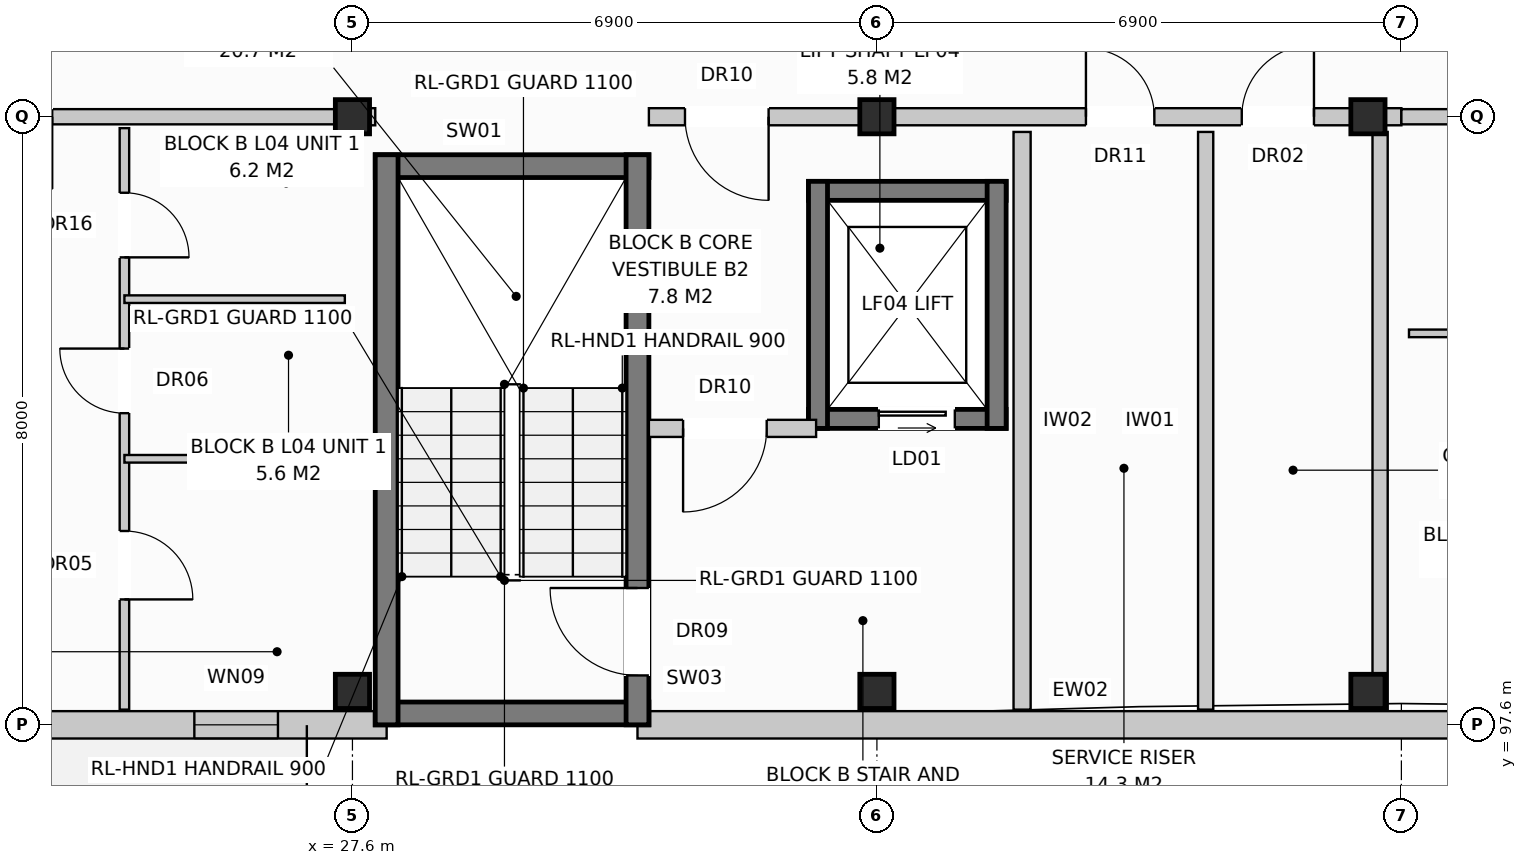
"""IFC4 building model, lengths in metres.
Left out: names, types, materials, properties, quantities, classifications, styles, units other than length and angle.
Written with IfcOpenShell. Run it as: python <this file> out.ifc"""

import sys

from ifc_helpers import new_model, si_unit, direction, frame, frame_2d, origin, origin_with_axes, origin_2d, place, context, subcontext, project, spatial, rectangle, extrude, element, fill, save


model = new_model("IFC4")
c1 = context("Model", 3, precision=1e-05, world=origin(), true_north=direction((0.0, 1.0)))
c2 = subcontext(c1, "Body", "Model", "MODEL_VIEW")
j1 = project(units=[si_unit("LENGTHUNIT", "METRE"), si_unit("PLANEANGLEUNIT", "RADIAN")], contexts=[c1])
p1 = place(None, origin())
s1 = spatial("IfcSite", under=j1, at=p1, CompositionType="ELEMENT")
p2 = place(p1, origin())
s2 = spatial("IfcBuilding", under=s1, at=p2, CompositionType="ELEMENT")
p3 = place(p2, frame((0.0, 0.0, 14.4)))
s3 = spatial("IfcBuildingStorey", under=s2, at=p3, CompositionType="ELEMENT", Elevation=14.4)
for number, where, z_axis, x_axis in (
    (1, (27.6, 98.04, 0.0), (0.0, 0.0, 1.0), (1.0, 0.0, 0.0)),
    (2, (27.6, 105.6, 0.0), (0.0, 0.0, 1.0), (1.0, 0.0, 0.0)),
    (3, (34.5, 98.04, 0.0), (0.0, 0.0, 1.0), (1.0, 0.0, 0.0)),
    (4, (34.5, 105.6, 0.0), (0.0, 0.0, 1.0), (1.0, 0.0, 0.0)),
    (5, (40.96, 98.04, 0.0), (0.0, 0.0, 1.0), (1.0, 0.0, 0.0)),
    (6, (40.96, 105.6, 0.0), (0.0, 0.0, 1.0), (1.0, 0.0, 0.0)),
):
    element("IfcColumn", number, at=place(p3, frame(where, z_axis=z_axis, x_axis=x_axis)), inside=s3, PredefinedType="COLUMN", context=c2, shape_type="SweptSolid", body=[
        extrude(rectangle(XDim=0.45, YDim=0.45, at=origin_2d()), origin(), (0.0, 0.0, 1.0), 3.2),
    ])
p4 = place(p3, frame((10.65, 97.6, 0.0), z_axis=(0.0, 0.0, 1.0), x_axis=(1.0, 0.0, 0.0)))
e7 = element("IfcWall", 7, at=p4, inside=s3, PredefinedType="STANDARD", context=c2, shape_type="SweptSolid", body=[
    extrude(rectangle(XDim=17.4, YDim=0.36, at=frame_2d((8.7, 0.0))), origin(), (0.0, 0.0, 1.0), 2.94),
])
p5 = place(p4, frame((11.87, 0.0, 0.0)))
e8 = element("IfcOpeningElement", 8, at=p5, cuts=e7, PredefinedType="OPENING", context=c2, shape_type="SweptSolid", body=[
    extrude(rectangle(XDim=0.95, YDim=2.1, at=frame_2d((0.475, 1.05))), frame((0.0, 0.192, 0.0), z_axis=(0.0, -1.0, 0.0), x_axis=(1.0, 0.0, 0.0)), (0.0, 0.0, 1.0), 0.384),
])
p6 = place(p4, frame((14.87, 0.0, 0.72)))
e9 = element("IfcOpeningElement", 9, at=p6, cuts=e7, PredefinedType="OPENING", context=c2, shape_type="SweptSolid", body=[
    extrude(rectangle(XDim=1.1, YDim=1.5, at=frame_2d((0.55, 0.75))), frame((0.0, 0.192, 0.0), z_axis=(0.0, -1.0, 0.0), x_axis=(1.0, 0.0, 0.0)), (0.0, 0.0, 1.0), 0.384),
])
p7 = place(p3, frame((31.35, 97.6, 0.0), z_axis=(0.0, 0.0, 1.0), x_axis=(1.0, 0.0, 0.0)))
e10 = element("IfcWall", 10, at=p7, inside=s3, PredefinedType="STANDARD", context=c2, shape_type="SweptSolid", body=[
    extrude(rectangle(XDim=23.68, YDim=0.36, at=frame_2d((11.84, 0.0))), origin(), (0.0, 0.0, 1.0), 2.94),
])
p8 = place(p7, frame((13.048, 0.0, 0.0)))
e11 = element("IfcOpeningElement", 11, at=p8, cuts=e10, PredefinedType="OPENING", context=c2, shape_type="SweptSolid", body=[
    extrude(rectangle(XDim=0.95, YDim=2.1, at=frame_2d((0.475, 1.05))), frame((0.0, 0.192, 0.0), z_axis=(0.0, -1.0, 0.0), x_axis=(1.0, 0.0, 0.0)), (0.0, 0.0, 1.0), 0.384),
])
p9 = place(p7, frame((10.845, 0.0, 0.8)))
e12 = element("IfcOpeningElement", 12, at=p9, cuts=e10, PredefinedType="OPENING", context=c2, shape_type="SweptSolid", body=[
    extrude(rectangle(XDim=1.95, YDim=1.65, at=frame_2d((0.975, 0.825))), frame((0.0, 0.192, 0.0), z_axis=(0.0, -1.0, 0.0), x_axis=(1.0, 0.0, 0.0)), (0.0, 0.0, 1.0), 0.384),
])
p10 = place(p7, frame((14.62, 0.0, 0.8)))
e13 = element("IfcOpeningElement", 13, at=p10, cuts=e10, PredefinedType="OPENING", context=c2, shape_type="SweptSolid", body=[
    extrude(rectangle(XDim=1.8, YDim=1.7, at=frame_2d((0.9, 0.85))), frame((0.0, 0.192, 0.0), z_axis=(0.0, -1.0, 0.0), x_axis=(1.0, 0.0, 0.0)), (0.0, 0.0, 1.0), 0.384),
])
p11 = place(p7, frame((20.67, 0.0, 0.72)))
e14 = element("IfcOpeningElement", 14, at=p11, cuts=e10, PredefinedType="OPENING", context=c2, shape_type="SweptSolid", body=[
    extrude(rectangle(XDim=1.1, YDim=1.5, at=frame_2d((0.55, 0.75))), frame((0.0, 0.192, 0.0), z_axis=(0.0, -1.0, 0.0), x_axis=(1.0, 0.0, 0.0)), (0.0, 0.0, 1.0), 0.384),
])
for number, where, z_axis, x_axis in (
    (15, (27.9, 97.75, 0.0), (0.0, 0.0, 1.0), (1.0, 0.0, 0.0)),
    (16, (27.9, 104.95, 0.0), (0.0, 0.0, 1.0), (1.0, 0.0, 0.0)),
):
    element("IfcWall", number, at=place(p3, frame(where, z_axis=z_axis, x_axis=x_axis)), inside=s3, PredefinedType="SHEAR", context=c2, shape_type="SweptSolid", body=[
        extrude(rectangle(XDim=3.6, YDim=0.3, at=frame_2d((1.8, 0.0))), origin(), (0.0, 0.0, 1.0), 2.94),
    ])
p12 = place(p3, frame((28.05, 97.6, 0.0), z_axis=(0.0, 0.0, 1.0), x_axis=(0.0, 1.0, 0.0)))
e17 = element("IfcWall", 17, at=p12, inside=s3, PredefinedType="SHEAR", context=c2, shape_type="SweptSolid", body=[
    extrude(rectangle(XDim=7.5, YDim=0.3, at=frame_2d((3.75, 0.0))), origin(), (0.0, 0.0, 1.0), 2.94),
])
p13 = place(p3, frame((31.35, 97.6, 0.0), z_axis=(0.0, 0.0, 1.0), x_axis=(0.0, 1.0, 0.0)))
e18 = element("IfcWall", 18, at=p13, inside=s3, PredefinedType="SHEAR", context=c2, shape_type="SweptSolid", body=[
    extrude(rectangle(XDim=7.5, YDim=0.3, at=frame_2d((3.75, 0.0))), origin(), (0.0, 0.0, 1.0), 2.94),
])
p14 = place(p13, frame((0.65, 0.0, 0.0)))
e19 = element("IfcOpeningElement", 19, at=p14, cuts=e18, PredefinedType="OPENING", context=c2, shape_type="SweptSolid", body=[
    extrude(rectangle(XDim=1.15, YDim=2.15, at=frame_2d((0.575, 1.075))), frame((0.0, 0.162, 0.0), z_axis=(0.0, -1.0, 0.0), x_axis=(1.0, 0.0, 0.0)), (0.0, 0.0, 1.0), 0.324),
])
p15 = place(p3, frame((33.6, 101.625, 0.0), z_axis=(0.0, 0.0, 1.0), x_axis=(1.0, 0.0, 0.0)))
e20 = element("IfcWall", 20, at=p15, inside=s3, PredefinedType="SHEAR", context=c2, shape_type="SweptSolid", body=[
    extrude(rectangle(XDim=2.6, YDim=0.25, at=frame_2d((1.3, 0.0))), origin(), (0.0, 0.0, 1.0), 2.94),
])
p16 = place(p15, frame((0.925, 0.0, 0.0)))
e21 = element("IfcOpeningElement", 21, at=p16, cuts=e20, PredefinedType="OPENING", context=c2, shape_type="SweptSolid", body=[
    extrude(rectangle(XDim=1.0, YDim=2.1, at=frame_2d((0.5, 1.05))), frame((0.0, 0.137, 0.0), z_axis=(0.0, -1.0, 0.0), x_axis=(1.0, 0.0, 0.0)), (0.0, 0.0, 1.0), 0.274),
])
p17 = place(p3, frame((33.6, 104.625, 0.0), z_axis=(0.0, 0.0, 1.0), x_axis=(1.0, 0.0, 0.0)))
e22 = element("IfcWall", 22, at=p17, inside=s3, PredefinedType="SHEAR", context=c2, shape_type="SweptSolid", body=[
    extrude(rectangle(XDim=2.6, YDim=0.25, at=frame_2d((1.3, 0.0))), origin(), (0.0, 0.0, 1.0), 2.94),
])
for number, where, z_axis, x_axis in (
    (23, (33.725, 101.5, 0.0), (0.0, 0.0, 1.0), (0.0, 1.0, 0.0)),
    (24, (36.075, 101.5, 0.0), (0.0, 0.0, 1.0), (0.0, 1.0, 0.0)),
):
    element("IfcWall", number, at=place(p3, frame(where, z_axis=z_axis, x_axis=x_axis)), inside=s3, PredefinedType="SHEAR", context=c2, shape_type="SweptSolid", body=[
        extrude(rectangle(XDim=3.25, YDim=0.25, at=frame_2d((1.625, 0.0))), origin(), (0.0, 0.0, 1.0), 2.94),
    ])
p18 = place(p3, frame((36.41, 97.8, 0.0), z_axis=(0.0, 0.0, 1.0), x_axis=(0.0, 1.0, 0.0)))
e25 = element("IfcWall", 25, at=p18, inside=s3, PredefinedType="PARTITIONING", context=c2, shape_type="SweptSolid", body=[
    extrude(rectangle(XDim=7.6, YDim=0.225, at=frame_2d((3.8, 0.0))), origin(), (0.0, 0.0, 1.0), 2.59),
])
p19 = place(p3, frame((31.5, 101.5, 0.0), z_axis=(0.0, 0.0, 1.0), x_axis=(1.0, 0.0, 0.0)))
e26 = element("IfcWall", 26, at=p19, inside=s3, PredefinedType="PARTITIONING", context=c2, shape_type="SweptSolid", body=[
    extrude(rectangle(XDim=2.2, YDim=0.225, at=frame_2d((1.1, 0.0))), origin(), (0.0, 0.0, 1.0), 2.94),
])
p20 = place(p19, frame((0.45, 0.0, 0.0)))
e27 = element("IfcOpeningElement", 27, at=p20, cuts=e26, PredefinedType="OPENING", context=c2, shape_type="SweptSolid", body=[
    extrude(rectangle(XDim=1.1, YDim=2.15, at=frame_2d((0.55, 1.075))), frame((0.0, 0.125, 0.0), z_axis=(0.0, -1.0, 0.0), x_axis=(1.0, 0.0, 0.0)), (0.0, 0.0, 1.0), 0.249),
])
p21 = place(p3, frame((27.6, 105.6, 0.0), z_axis=(0.0, 0.0, 1.0), x_axis=(1.0, 0.0, 0.0)))
e28 = element("IfcWall", 28, at=p21, inside=s3, PredefinedType="PARTITIONING", context=c2, shape_type="SweptSolid", body=[
    extrude(rectangle(XDim=0.3, YDim=0.225, at=frame_2d((0.15, 0.0))), origin(), (0.0, 0.0, 1.0), 2.94),
])
for number, where, z_axis, x_axis in (
    (29, (38.825, 97.8, 0.0), (0.0, 0.0, 1.0), (0.0, 1.0, 0.0)),
    (30, (41.12, 97.8, 0.0), (0.0, 0.0, 1.0), (0.0, 1.0, 0.0)),
):
    element("IfcWall", number, at=place(p3, frame(where, z_axis=z_axis, x_axis=x_axis)), inside=s3, PredefinedType="PARTITIONING", context=c2, shape_type="SweptSolid", body=[
        extrude(rectangle(XDim=7.6, YDim=0.2, at=frame_2d((3.8, 0.0))), origin(), (0.0, 0.0, 1.0), 2.94),
    ])
p22 = place(p3, frame((31.5, 105.6, 0.0), z_axis=(0.0, 0.0, 1.0), x_axis=(1.0, 0.0, 0.0)))
e31 = element("IfcWall", 31, at=p22, inside=s3, PredefinedType="PARTITIONING", context=c2, shape_type="SweptSolid", body=[
    extrude(rectangle(XDim=9.9, YDim=0.225, at=frame_2d((4.95, 0.0))), origin(), (0.0, 0.0, 1.0), 2.38),
])
p23 = place(p22, frame((0.475, 0.0, 0.0)))
e32 = element("IfcOpeningElement", 32, at=p23, cuts=e31, PredefinedType="OPENING", context=c2, shape_type="SweptSolid", body=[
    extrude(rectangle(XDim=1.1, YDim=2.15, at=frame_2d((0.55, 1.075))), frame((0.0, 0.125, 0.0), z_axis=(0.0, -1.0, 0.0), x_axis=(1.0, 0.0, 0.0)), (0.0, 0.0, 1.0), 0.249),
])
p24 = place(p22, frame((5.75, 0.0, 0.0)))
e33 = element("IfcOpeningElement", 33, at=p24, cuts=e31, PredefinedType="OPENING", context=c2, shape_type="SweptSolid", body=[
    extrude(rectangle(XDim=0.9, YDim=2.1, at=frame_2d((0.45, 1.05))), frame((0.0, 0.125, 0.0), z_axis=(0.0, -1.0, 0.0), x_axis=(1.0, 0.0, 0.0)), (0.0, 0.0, 1.0), 0.249),
])
p25 = place(p22, frame((7.8, 0.0, 0.0)))
e34 = element("IfcOpeningElement", 34, at=p25, cuts=e31, PredefinedType="OPENING", context=c2, shape_type="SweptSolid", body=[
    extrude(rectangle(XDim=0.95, YDim=2.15, at=frame_2d((0.475, 1.075))), frame((0.0, 0.125, 0.0), z_axis=(0.0, -1.0, 0.0), x_axis=(1.0, 0.0, 0.0)), (0.0, 0.0, 1.0), 0.249),
])
p26 = place(p3, frame((20.7, 105.6, 0.0), z_axis=(0.0, 0.0, 1.0), x_axis=(1.0, 0.0, 0.0)))
e35 = element("IfcWall", 35, at=p26, inside=s3, PredefinedType="PARTITIONING", context=c2, shape_type="SweptSolid", body=[
    extrude(rectangle(XDim=6.9, YDim=0.2, at=frame_2d((3.45, 0.0))), origin(), (0.0, 0.0, 1.0), 2.38),
])
p27 = place(p26, frame((2.0, 0.0, 0.0)))
e36 = element("IfcOpeningElement", 36, at=p27, cuts=e35, PredefinedType="OPENING", context=c2, shape_type="SweptSolid", body=[
    extrude(rectangle(XDim=0.95, YDim=2.15, at=frame_2d((0.475, 1.075))), frame((0.0, 0.112, 0.0), z_axis=(0.0, -1.0, 0.0), x_axis=(1.0, 0.0, 0.0)), (0.0, 0.0, 1.0), 0.224),
])
p28 = place(p3, frame((24.6, 105.45, 0.0), z_axis=(0.0, 0.0, 1.0), x_axis=(0.0, -1.0, 0.0)))
e37 = element("IfcWall", 37, at=p28, inside=s3, PredefinedType="PARTITIONING", context=c2, shape_type="SweptSolid", body=[
    extrude(rectangle(XDim=7.65, YDim=0.125, at=frame_2d((3.825, 0.0))), origin(), (0.0, 0.0, 1.0), 2.94),
])
p29 = place(p28, frame((0.85, 0.0, 0.0)))
e38 = element("IfcOpeningElement", 38, at=p29, cuts=e37, PredefinedType="OPENING", context=c2, shape_type="SweptSolid", body=[
    extrude(rectangle(XDim=0.85, YDim=2.1, at=frame_2d((0.425, 1.05))), frame((0.0, 0.074, 0.0), z_axis=(0.0, -1.0, 0.0), x_axis=(1.0, 0.0, 0.0)), (0.0, 0.0, 1.0), 0.149),
])
p30 = place(p28, frame((2.9, 0.0, 0.0)))
e39 = element("IfcOpeningElement", 39, at=p30, cuts=e37, PredefinedType="OPENING", context=c2, shape_type="SweptSolid", body=[
    extrude(rectangle(XDim=0.85, YDim=2.05, at=frame_2d((0.425, 1.025))), frame((0.0, 0.074, 0.0), z_axis=(0.0, -1.0, 0.0), x_axis=(1.0, 0.0, 0.0)), (0.0, 0.0, 1.0), 0.149),
])
p31 = place(p28, frame((5.3, 0.0, 0.0)))
e40 = element("IfcOpeningElement", 40, at=p31, cuts=e37, PredefinedType="OPENING", context=c2, shape_type="SweptSolid", body=[
    extrude(rectangle(XDim=0.9, YDim=2.1, at=frame_2d((0.45, 1.05))), frame((0.0, 0.074, 0.0), z_axis=(0.0, -1.0, 0.0), x_axis=(1.0, 0.0, 0.0)), (0.0, 0.0, 1.0), 0.149),
])
for number, where, z_axis, x_axis in (
    (41, (24.6, 103.2, 0.0), (0.0, 0.0, 1.0), (1.0, 0.0, 0.0)),
    (42, (24.6, 101.1, 0.0), (0.0, 0.0, 1.0), (1.0, 0.0, 0.0)),
):
    element("IfcWall", number, at=place(p3, frame(where, z_axis=z_axis, x_axis=x_axis)), inside=s3, PredefinedType="PARTITIONING", context=c2, shape_type="SweptSolid", body=[
        extrude(rectangle(XDim=2.9, YDim=0.1, at=frame_2d((1.45, 0.0))), origin(), (0.0, 0.0, 1.0), 2.94),
    ])
p32 = place(p3, frame((41.4, 105.6, 0.0), z_axis=(0.0, 0.0, 1.0), x_axis=(1.0, 0.0, 0.0)))
e43 = element("IfcWall", 43, at=p32, inside=s3, PredefinedType="PARTITIONING", context=c2, shape_type="SweptSolid", body=[
    extrude(rectangle(XDim=13.8, YDim=0.2, at=frame_2d((6.9, 0.0))), origin(), (0.0, 0.0, 1.0), 2.38),
])
p33 = place(p32, frame((9.6, 0.0, 0.0)))
e44 = element("IfcOpeningElement", 44, at=p33, cuts=e43, PredefinedType="OPENING", context=c2, shape_type="SweptSolid", body=[
    extrude(rectangle(XDim=0.95, YDim=2.15, at=frame_2d((0.475, 1.075))), frame((0.0, 0.112, 0.0), z_axis=(0.0, -1.0, 0.0), x_axis=(1.0, 0.0, 0.0)), (0.0, 0.0, 1.0), 0.224),
])
p34 = place(p3, frame((41.5, 102.75, 0.0), z_axis=(0.0, 0.0, 1.0), x_axis=(1.0, 0.0, 0.0)))
e45 = element("IfcWall", 45, at=p34, inside=s3, PredefinedType="PARTITIONING", context=c2, shape_type="SweptSolid", body=[
    extrude(rectangle(XDim=8.6, YDim=0.1, at=frame_2d((4.3, 0.0))), origin(), (0.0, 0.0, 1.0), 2.94),
])
p35 = place(p34, frame((1.4, 0.0, 0.0)))
e46 = element("IfcOpeningElement", 46, at=p35, cuts=e45, PredefinedType="OPENING", context=c2, shape_type="SweptSolid", body=[
    extrude(rectangle(XDim=0.85, YDim=2.05, at=frame_2d((0.425, 1.025))), frame((0.0, 0.062, 0.0), z_axis=(0.0, -1.0, 0.0), x_axis=(1.0, 0.0, 0.0)), (0.0, 0.0, 1.0), 0.124),
])
p36 = place(p34, frame((4.65, 0.0, 0.0)))
e47 = element("IfcOpeningElement", 47, at=p36, cuts=e45, PredefinedType="OPENING", context=c2, shape_type="SweptSolid", body=[
    extrude(rectangle(XDim=0.85, YDim=2.05, at=frame_2d((0.425, 1.025))), frame((0.0, 0.062, 0.0), z_axis=(0.0, -1.0, 0.0), x_axis=(1.0, 0.0, 0.0)), (0.0, 0.0, 1.0), 0.124),
])
p37 = place(p34, frame((6.8, 0.0, 0.0)))
e48 = element("IfcOpeningElement", 48, at=p37, cuts=e45, PredefinedType="OPENING", context=c2, shape_type="SweptSolid", body=[
    extrude(rectangle(XDim=0.85, YDim=2.1, at=frame_2d((0.425, 1.05))), frame((0.0, 0.062, 0.0), z_axis=(0.0, -1.0, 0.0), x_axis=(1.0, 0.0, 0.0)), (0.0, 0.0, 1.0), 0.124),
])
p38 = place(p6, origin_with_axes())
e49 = element("IfcWindow", 49, at=p38, inside=s3, PartitioningType="SINGLE_PANEL", PredefinedType="WINDOW", context=c2, shape_type="SweptSolid", body=[
    extrude(rectangle(XDim=1.1, YDim=1.5, at=frame_2d((0.55, 0.75))), frame((0.0, 0.03, 0.0), z_axis=(0.0, -1.0, 0.0), x_axis=(1.0, 0.0, 0.0)), (0.0, 0.0, 1.0), 0.06),
])
fill(e9, e49)
p39 = place(p14, origin_with_axes())
e50 = element("IfcDoor", 50, at=p39, inside=s3, OperationType="SINGLE_SWING_RIGHT", PredefinedType="DOOR", context=c2, shape_type="SweptSolid", body=[
    extrude(rectangle(XDim=1.15, YDim=2.15, at=frame_2d((0.575, 1.075))), frame((0.0, 0.025, 0.0), z_axis=(0.0, -1.0, 0.0), x_axis=(1.0, 0.0, 0.0)), (0.0, 0.0, 1.0), 0.05),
])
fill(e19, e50)
p40 = place(p16, origin_with_axes())
e51 = element("IfcDoor", 51, at=p40, inside=s3, OperationType="SLIDING_TO_LEFT", PredefinedType="DOOR", context=c2, shape_type="SweptSolid", body=[
    extrude(rectangle(XDim=1.0, YDim=2.1, at=frame_2d((0.5, 1.05))), frame((0.0, 0.025, 0.0), z_axis=(0.0, -1.0, 0.0), x_axis=(1.0, 0.0, 0.0)), (0.0, 0.0, 1.0), 0.05),
])
fill(e21, e51)
p41 = place(p20, frame((1.1, 0.0, 0.0), z_axis=(0.0, 0.0, 1.0), x_axis=(-1.0, 0.0, 0.0)))
e52 = element("IfcDoor", 52, at=p41, inside=s3, OperationType="SINGLE_SWING_LEFT", PredefinedType="DOOR", context=c2, shape_type="SweptSolid", body=[
    extrude(rectangle(XDim=1.1, YDim=2.15, at=frame_2d((0.55, 1.075))), frame((0.0, 0.025, 0.0), z_axis=(0.0, -1.0, 0.0), x_axis=(1.0, 0.0, 0.0)), (0.0, 0.0, 1.0), 0.05),
])
fill(e27, e52)
p42 = place(p23, frame((1.1, 0.0, 0.0), z_axis=(0.0, 0.0, 1.0), x_axis=(-1.0, 0.0, 0.0)))
e53 = element("IfcDoor", 53, at=p42, inside=s3, OperationType="SINGLE_SWING_RIGHT", PredefinedType="DOOR", context=c2, shape_type="SweptSolid", body=[
    extrude(rectangle(XDim=1.1, YDim=2.15, at=frame_2d((0.55, 1.075))), frame((0.0, 0.025, 0.0), z_axis=(0.0, -1.0, 0.0), x_axis=(1.0, 0.0, 0.0)), (0.0, 0.0, 1.0), 0.05),
])
fill(e32, e53)
p43 = place(p24, origin_with_axes())
e54 = element("IfcDoor", 54, at=p43, inside=s3, OperationType="SINGLE_SWING_LEFT", PredefinedType="DOOR", context=c2, shape_type="SweptSolid", body=[
    extrude(rectangle(XDim=0.9, YDim=2.1, at=frame_2d((0.45, 1.05))), frame((0.0, 0.025, 0.0), z_axis=(0.0, -1.0, 0.0), x_axis=(1.0, 0.0, 0.0)), (0.0, 0.0, 1.0), 0.05),
])
fill(e33, e54)
p44 = place(p25, origin_with_axes())
e55 = element("IfcDoor", 55, at=p44, inside=s3, OperationType="SINGLE_SWING_RIGHT", PredefinedType="DOOR", context=c2, shape_type="SweptSolid", body=[
    extrude(rectangle(XDim=0.95, YDim=2.15, at=frame_2d((0.475, 1.075))), frame((0.0, 0.025, 0.0), z_axis=(0.0, -1.0, 0.0), x_axis=(1.0, 0.0, 0.0)), (0.0, 0.0, 1.0), 0.05),
])
fill(e34, e55)
p45 = place(p29, origin_with_axes())
e56 = element("IfcDoor", 56, at=p45, inside=s3, OperationType="SINGLE_SWING_RIGHT", PredefinedType="DOOR", context=c2, shape_type="SweptSolid", body=[
    extrude(rectangle(XDim=0.85, YDim=2.1, at=frame_2d((0.425, 1.05))), frame((0.0, 0.025, 0.0), z_axis=(0.0, -1.0, 0.0), x_axis=(1.0, 0.0, 0.0)), (0.0, 0.0, 1.0), 0.05),
])
fill(e38, e56)
p46 = place(p30, frame((0.85, 0.0, 0.0), z_axis=(0.0, 0.0, 1.0), x_axis=(-1.0, 0.0, 0.0)))
e57 = element("IfcDoor", 57, at=p46, inside=s3, OperationType="SINGLE_SWING_LEFT", PredefinedType="DOOR", context=c2, shape_type="SweptSolid", body=[
    extrude(rectangle(XDim=0.85, YDim=2.05, at=frame_2d((0.425, 1.025))), frame((0.0, 0.025, 0.0), z_axis=(0.0, -1.0, 0.0), x_axis=(1.0, 0.0, 0.0)), (0.0, 0.0, 1.0), 0.05),
])
fill(e39, e57)
p47 = place(p31, origin_with_axes())
e58 = element("IfcDoor", 58, at=p47, inside=s3, OperationType="SINGLE_SWING_RIGHT", PredefinedType="DOOR", context=c2, shape_type="SweptSolid", body=[
    extrude(rectangle(XDim=0.9, YDim=2.1, at=frame_2d((0.45, 1.05))), frame((0.0, 0.025, 0.0), z_axis=(0.0, -1.0, 0.0), x_axis=(1.0, 0.0, 0.0)), (0.0, 0.0, 1.0), 0.05),
])
fill(e40, e58)
save(model, sys.argv[1])
